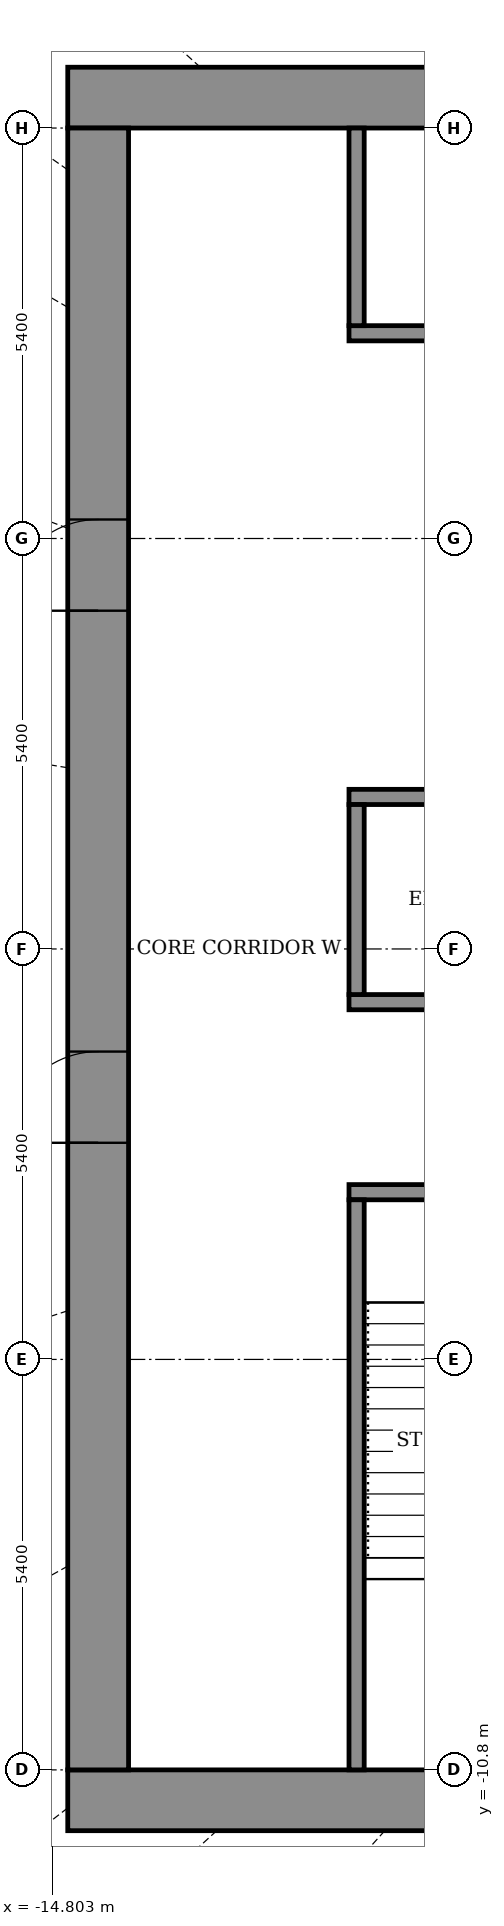
"""IFC4 building model, lengths in metres.
Left out: names, types, materials, properties, quantities, classifications, styles, units other than length and angle.
Written with IfcOpenShell. Run it as: python <this file> out.ifc"""

import sys

from ifc_helpers import new_model, si_unit, direction, frame, frame_2d, origin, place, context, subcontext, project, spatial, rectangle, extrude, element, fill, save


model = new_model("IFC4")
c1 = context("Model", 3, precision=1e-05, world=origin(), true_north=direction((0.0, 1.0)))
c2 = subcontext(c1, "Body", "Model", "MODEL_VIEW")
j1 = project(units=[si_unit("LENGTHUNIT", "METRE"), si_unit("PLANEANGLEUNIT", "RADIAN")], contexts=[c1])
p1 = place(None, origin())
s1 = spatial("IfcSite", under=j1, at=p1, CompositionType="ELEMENT")
p2 = place(p1, origin())
s2 = spatial("IfcBuilding", under=s1, at=p2, CompositionType="ELEMENT")
p3 = place(p2, frame((0.0, 0.0, 226.5)))
s3 = spatial("IfcBuildingStorey", under=s2, at=p3, CompositionType="ELEMENT", Elevation=226.5)
for number, where, z_axis, x_axis in (
    (1, (-14.6, -11.2, 0.0), (0.0, 0.0, 1.0), (1.0, 0.0, 0.0)),
    (2, (-14.6, 11.2, 0.0), (0.0, 0.0, 1.0), (1.0, 0.0, 0.0)),
):
    element("IfcWall", number, at=place(p3, frame(where, z_axis=z_axis, x_axis=x_axis)), inside=s3, PredefinedType="SHEAR", context=c2, shape_type="SweptSolid", body=[
        extrude(rectangle(XDim=29.2, YDim=0.8, at=frame_2d((14.6, 0.0))), origin(), (0.0, 0.0, 1.0), 4.6),
    ])
p4 = place(p3, frame((-14.2, -10.8, 0.0), z_axis=(0.0, 0.0, 1.0), x_axis=(0.0, 1.0, 0.0)))
e3 = element("IfcWall", 3, at=p4, inside=s3, PredefinedType="SHEAR", context=c2, shape_type="SweptSolid", body=[
    extrude(rectangle(XDim=21.6, YDim=0.8, at=frame_2d((10.8, 0.0))), origin(), (0.0, 0.0, 1.0), 4.6),
])
p5 = place(p4, frame((8.25, 0.0, 0.0)))
e4 = element("IfcOpeningElement", 4, at=p5, cuts=e3, PredefinedType="OPENING", context=c2, shape_type="SweptSolid", body=[
    extrude(rectangle(XDim=1.2, YDim=2.1, at=frame_2d((0.6, 1.05))), frame((0.0, 0.41, 0.0), z_axis=(0.0, -1.0, 0.0), x_axis=(1.0, 0.0, 0.0)), (0.0, 0.0, 1.0), 0.82),
])
p6 = place(p4, frame((15.25, 0.0, 0.0)))
e5 = element("IfcOpeningElement", 5, at=p6, cuts=e3, PredefinedType="OPENING", context=c2, shape_type="SweptSolid", body=[
    extrude(rectangle(XDim=1.2, YDim=2.1, at=frame_2d((0.6, 1.05))), frame((0.0, 0.41, 0.0), z_axis=(0.0, -1.0, 0.0), x_axis=(1.0, 0.0, 0.0)), (0.0, 0.0, 1.0), 0.82),
])
p7 = place(p3, frame((-10.9, -3.2, 0.0), z_axis=(0.0, 0.0, 1.0), x_axis=(1.0, 0.0, 0.0)))
e6 = element("IfcWall", 6, at=p7, inside=s3, PredefinedType="SHEAR", context=c2, shape_type="SweptSolid", body=[
    extrude(rectangle(XDim=21.8, YDim=0.2, at=frame_2d((10.9, 0.0))), origin(), (0.0, 0.0, 1.0), 4.05),
])
p8 = place(p7, frame((1.075, 0.0, 0.0)))
e7 = element("IfcOpeningElement", 7, at=p8, cuts=e6, PredefinedType="OPENING", context=c2, shape_type="SweptSolid", body=[
    extrude(rectangle(XDim=1.1, YDim=2.1, at=frame_2d((0.55, 1.05))), frame((0.0, 0.11, 0.0), z_axis=(0.0, -1.0, 0.0), x_axis=(1.0, 0.0, 0.0)), (0.0, 0.0, 1.0), 0.22),
])
p9 = place(p7, frame((10.325, 0.0, 0.0)))
e8 = element("IfcOpeningElement", 8, at=p9, cuts=e6, PredefinedType="OPENING", context=c2, shape_type="SweptSolid", body=[
    extrude(rectangle(XDim=1.1, YDim=2.1, at=frame_2d((0.55, 1.05))), frame((0.0, 0.11, 0.0), z_axis=(0.0, -1.0, 0.0), x_axis=(1.0, 0.0, 0.0)), (0.0, 0.0, 1.0), 0.22),
])
p10 = place(p7, frame((19.625, 0.0, 0.0)))
e9 = element("IfcOpeningElement", 9, at=p10, cuts=e6, PredefinedType="OPENING", context=c2, shape_type="SweptSolid", body=[
    extrude(rectangle(XDim=1.1, YDim=2.1, at=frame_2d((0.55, 1.05))), frame((0.0, 0.11, 0.0), z_axis=(0.0, -1.0, 0.0), x_axis=(1.0, 0.0, 0.0)), (0.0, 0.0, 1.0), 0.22),
])
p11 = place(p7, frame((5.7, 0.0, 0.0)))
e10 = element("IfcOpeningElement", 10, at=p11, cuts=e6, PredefinedType="OPENING", context=c2, shape_type="SweptSolid", body=[
    extrude(rectangle(XDim=1.1, YDim=2.1, at=frame_2d((0.55, 1.05))), frame((0.0, 0.11, 0.0), z_axis=(0.0, -1.0, 0.0), x_axis=(1.0, 0.0, 0.0)), (0.0, 0.0, 1.0), 0.22),
])
p12 = place(p7, frame((14.975, 0.0, 0.0)))
e11 = element("IfcOpeningElement", 11, at=p12, cuts=e6, PredefinedType="OPENING", context=c2, shape_type="SweptSolid", body=[
    extrude(rectangle(XDim=1.1, YDim=2.1, at=frame_2d((0.55, 1.05))), frame((0.0, 0.11, 0.0), z_axis=(0.0, -1.0, 0.0), x_axis=(1.0, 0.0, 0.0)), (0.0, 0.0, 1.0), 0.22),
])
p13 = place(p3, frame((-10.9, -0.7, 0.0), z_axis=(0.0, 0.0, 1.0), x_axis=(1.0, 0.0, 0.0)))
e12 = element("IfcWall", 12, at=p13, inside=s3, PredefinedType="SHEAR", context=c2, shape_type="SweptSolid", body=[
    extrude(rectangle(XDim=21.8, YDim=0.2, at=frame_2d((10.9, 0.0))), origin(), (0.0, 0.0, 1.0), 4.05),
])
p14 = place(p3, frame((-10.9, 2.0, 0.0), z_axis=(0.0, 0.0, 1.0), x_axis=(1.0, 0.0, 0.0)))
e13 = element("IfcWall", 13, at=p14, inside=s3, PredefinedType="SHEAR", context=c2, shape_type="SweptSolid", body=[
    extrude(rectangle(XDim=21.8, YDim=0.2, at=frame_2d((10.9, 0.0))), origin(), (0.0, 0.0, 1.0), 4.05),
])
p15 = place(p14, frame((4.95, 0.0, 0.0)))
e14 = element("IfcOpeningElement", 14, at=p15, cuts=e13, PredefinedType="OPENING", context=c2, shape_type="SweptSolid", body=[
    extrude(rectangle(XDim=1.1, YDim=2.1, at=frame_2d((0.55, 1.05))), frame((0.0, 0.11, 0.0), z_axis=(0.0, -1.0, 0.0), x_axis=(1.0, 0.0, 0.0)), (0.0, 0.0, 1.0), 0.22),
])
p16 = place(p14, frame((7.65, 0.0, 0.0)))
e15 = element("IfcOpeningElement", 15, at=p16, cuts=e13, PredefinedType="OPENING", context=c2, shape_type="SweptSolid", body=[
    extrude(rectangle(XDim=1.1, YDim=2.1, at=frame_2d((0.55, 1.05))), frame((0.0, 0.11, 0.0), z_axis=(0.0, -1.0, 0.0), x_axis=(1.0, 0.0, 0.0)), (0.0, 0.0, 1.0), 0.22),
])
p17 = place(p14, frame((10.35, 0.0, 0.0)))
e16 = element("IfcOpeningElement", 16, at=p17, cuts=e13, PredefinedType="OPENING", context=c2, shape_type="SweptSolid", body=[
    extrude(rectangle(XDim=1.1, YDim=2.1, at=frame_2d((0.55, 1.05))), frame((0.0, 0.11, 0.0), z_axis=(0.0, -1.0, 0.0), x_axis=(1.0, 0.0, 0.0)), (0.0, 0.0, 1.0), 0.22),
])
p18 = place(p14, frame((1.675, 0.0, 0.0)))
e17 = element("IfcOpeningElement", 17, at=p18, cuts=e13, PredefinedType="OPENING", context=c2, shape_type="SweptSolid", body=[
    extrude(rectangle(XDim=0.9, YDim=2.1, at=frame_2d((0.45, 1.05))), frame((0.0, 0.11, 0.0), z_axis=(0.0, -1.0, 0.0), x_axis=(1.0, 0.0, 0.0)), (0.0, 0.0, 1.0), 0.22),
])
p19 = place(p14, frame((16.525, 0.0, 0.0)))
e18 = element("IfcOpeningElement", 18, at=p19, cuts=e13, PredefinedType="OPENING", context=c2, shape_type="SweptSolid", body=[
    extrude(rectangle(XDim=0.9, YDim=2.1, at=frame_2d((0.45, 1.05))), frame((0.0, 0.11, 0.0), z_axis=(0.0, -1.0, 0.0), x_axis=(1.0, 0.0, 0.0)), (0.0, 0.0, 1.0), 0.22),
])
p20 = place(p3, frame((-10.9, 8.1, 0.0), z_axis=(0.0, 0.0, 1.0), x_axis=(1.0, 0.0, 0.0)))
e19 = element("IfcWall", 19, at=p20, inside=s3, PredefinedType="SHEAR", context=c2, shape_type="SweptSolid", body=[
    extrude(rectangle(XDim=21.8, YDim=0.2, at=frame_2d((10.9, 0.0))), origin(), (0.0, 0.0, 1.0), 4.05),
])
p21 = place(p20, frame((4.95, 0.0, 0.0)))
e20 = element("IfcOpeningElement", 20, at=p21, cuts=e19, PredefinedType="OPENING", context=c2, shape_type="SweptSolid", body=[
    extrude(rectangle(XDim=1.1, YDim=2.1, at=frame_2d((0.55, 1.05))), frame((0.0, 0.11, 0.0), z_axis=(0.0, -1.0, 0.0), x_axis=(1.0, 0.0, 0.0)), (0.0, 0.0, 1.0), 0.22),
])
p22 = place(p20, frame((7.65, 0.0, 0.0)))
e21 = element("IfcOpeningElement", 21, at=p22, cuts=e19, PredefinedType="OPENING", context=c2, shape_type="SweptSolid", body=[
    extrude(rectangle(XDim=1.1, YDim=2.1, at=frame_2d((0.55, 1.05))), frame((0.0, 0.11, 0.0), z_axis=(0.0, -1.0, 0.0), x_axis=(1.0, 0.0, 0.0)), (0.0, 0.0, 1.0), 0.22),
])
p23 = place(p20, frame((10.35, 0.0, 0.0)))
e22 = element("IfcOpeningElement", 22, at=p23, cuts=e19, PredefinedType="OPENING", context=c2, shape_type="SweptSolid", body=[
    extrude(rectangle(XDim=1.1, YDim=2.1, at=frame_2d((0.55, 1.05))), frame((0.0, 0.11, 0.0), z_axis=(0.0, -1.0, 0.0), x_axis=(1.0, 0.0, 0.0)), (0.0, 0.0, 1.0), 0.22),
])
p24 = place(p20, frame((1.675, 0.0, 0.0)))
e23 = element("IfcOpeningElement", 23, at=p24, cuts=e19, PredefinedType="OPENING", context=c2, shape_type="SweptSolid", body=[
    extrude(rectangle(XDim=0.9, YDim=2.1, at=frame_2d((0.45, 1.05))), frame((0.0, 0.11, 0.0), z_axis=(0.0, -1.0, 0.0), x_axis=(1.0, 0.0, 0.0)), (0.0, 0.0, 1.0), 0.22),
])
p25 = place(p20, frame((13.825, 0.0, 0.0)))
e24 = element("IfcOpeningElement", 24, at=p25, cuts=e19, PredefinedType="OPENING", context=c2, shape_type="SweptSolid", body=[
    extrude(rectangle(XDim=0.9, YDim=2.1, at=frame_2d((0.45, 1.05))), frame((0.0, 0.11, 0.0), z_axis=(0.0, -1.0, 0.0), x_axis=(1.0, 0.0, 0.0)), (0.0, 0.0, 1.0), 0.22),
])
p26 = place(p20, frame((18.55, 0.0, 0.0)))
e25 = element("IfcOpeningElement", 25, at=p26, cuts=e19, PredefinedType="OPENING", context=c2, shape_type="SweptSolid", body=[
    extrude(rectangle(XDim=0.9, YDim=2.1, at=frame_2d((0.45, 1.05))), frame((0.0, 0.11, 0.0), z_axis=(0.0, -1.0, 0.0), x_axis=(1.0, 0.0, 0.0)), (0.0, 0.0, 1.0), 0.22),
])
p27 = place(p3, frame((-10.8, -10.8, 0.0), z_axis=(0.0, 0.0, 1.0), x_axis=(0.0, 1.0, 0.0)))
e26 = element("IfcWall", 26, at=p27, inside=s3, PredefinedType="SHEAR", context=c2, shape_type="SweptSolid", body=[
    extrude(rectangle(XDim=7.5, YDim=0.2, at=frame_2d((3.75, 0.0))), origin(), (0.0, 0.0, 1.0), 4.05),
])
p28 = place(p3, frame((-10.8, -0.6, 0.0), z_axis=(0.0, 0.0, 1.0), x_axis=(0.0, 1.0, 0.0)))
e27 = element("IfcWall", 27, at=p28, inside=s3, PredefinedType="STANDARD", context=c2, shape_type="SweptSolid", body=[
    extrude(rectangle(XDim=2.5, YDim=0.2, at=frame_2d((1.25, 0.0))), origin(), (0.0, 0.0, 1.0), 4.05),
])
p29 = place(p3, frame((-10.8, 8.2, 0.0), z_axis=(0.0, 0.0, 1.0), x_axis=(0.0, 1.0, 0.0)))
e28 = element("IfcWall", 28, at=p29, inside=s3, PredefinedType="STANDARD", context=c2, shape_type="SweptSolid", body=[
    extrude(rectangle(XDim=2.6, YDim=0.2, at=frame_2d((1.3, 0.0))), origin(), (0.0, 0.0, 1.0), 4.05),
])
p30 = place(p5, origin())
e29 = element("IfcDoor", 29, at=p30, inside=s3, OperationType="DOUBLE_DOOR_SINGLE_SWING", PredefinedType="DOOR", context=c2, shape_type="SweptSolid", body=[
    extrude(rectangle(XDim=1.2, YDim=2.1, at=frame_2d((0.6, 1.05))), frame((0.0, 0.025, 0.0), z_axis=(0.0, -1.0, 0.0), x_axis=(1.0, 0.0, 0.0)), (0.0, 0.0, 1.0), 0.05),
])
fill(e4, e29)
p31 = place(p6, origin())
e30 = element("IfcDoor", 30, at=p31, inside=s3, OperationType="DOUBLE_DOOR_SINGLE_SWING", PredefinedType="DOOR", context=c2, shape_type="SweptSolid", body=[
    extrude(rectangle(XDim=1.2, YDim=2.1, at=frame_2d((0.6, 1.05))), frame((0.0, 0.025, 0.0), z_axis=(0.0, -1.0, 0.0), x_axis=(1.0, 0.0, 0.0)), (0.0, 0.0, 1.0), 0.05),
])
fill(e5, e30)
save(model, sys.argv[1])
